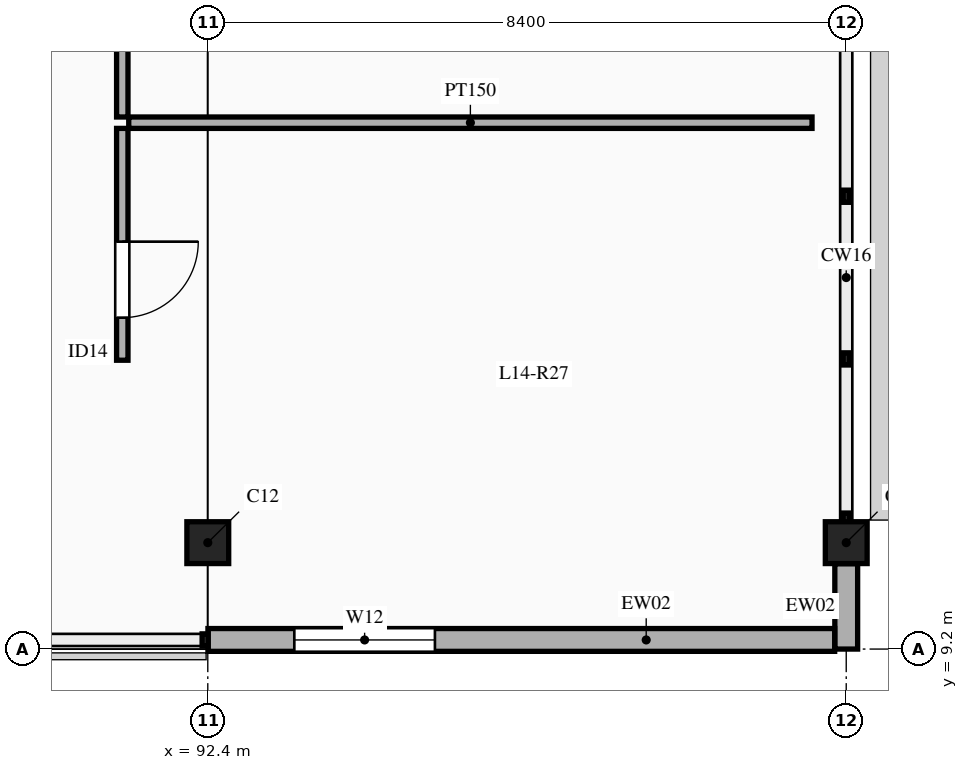
"""IFC4 building model, lengths in metres.
Left out: names, types, materials, properties, quantities, classifications, styles, units other than length and angle.
Written with IfcOpenShell. Run it as: python <this file> out.ifc"""

import sys

from ifc_helpers import new_model, si_unit, direction, frame, frame_2d, origin, origin_2d, place, context, subcontext, project, spatial, rectangle, extrude, element, fill, save


model = new_model("IFC4")
c1 = context("Model", 3, precision=1e-05, world=origin(), true_north=direction((0.0, 1.0)))
c2 = subcontext(c1, "Body", "Model", "MODEL_VIEW")
j1 = project(units=[si_unit("LENGTHUNIT", "METRE"), si_unit("PLANEANGLEUNIT", "RADIAN")], contexts=[c1])
p1 = place(None, origin())
s1 = spatial("IfcSite", under=j1, at=p1, CompositionType="ELEMENT")
p2 = place(p1, origin())
s2 = spatial("IfcBuilding", under=s1, at=p2, CompositionType="ELEMENT")
p3 = place(p2, frame((0.0, 0.0, 64.5)))
s3 = spatial("IfcBuildingStorey", under=s2, at=p3, CompositionType="ELEMENT", Elevation=64.5)
for number, where, z_axis, x_axis in (
    (1, (92.4, 10.6, 0.0), (0.0, 0.0, 1.0), (1.0, 0.0, 0.0)),
    (2, (100.8, 10.6, 0.0), (0.0, 0.0, 1.0), (1.0, 0.0, 0.0)),
):
    element("IfcColumn", number, at=place(p3, frame(where, z_axis=z_axis, x_axis=x_axis)), inside=s3, PredefinedType="COLUMN", context=c2, shape_type="SweptSolid", body=[
        extrude(rectangle(XDim=0.55, YDim=0.55, at=origin_2d()), origin(), (0.0, 0.0, 1.0), 4.5),
    ])
p4 = place(p3, frame((100.8, 9.2, 0.0), z_axis=(0.0, 0.0, 1.0), x_axis=(0.0, 1.0, 0.0)))
e3 = element("IfcWall", 3, at=p4, inside=s3, PredefinedType="SOLIDWALL", context=c2, shape_type="SweptSolid", body=[
    extrude(rectangle(XDim=1.123, YDim=0.3, at=frame_2d((0.562, 0.0))), origin(), (0.0, 0.0, 1.0), 3.55),
])
p5 = place(p3, frame((92.402, 9.32, 0.0), z_axis=(0.0, 0.0, 1.0), x_axis=(1.0, 0.0, 0.0)))
e4 = element("IfcWall", 4, at=p5, inside=s3, PredefinedType="SOLIDWALL", context=c2, shape_type="SweptSolid", body=[
    extrude(rectangle(XDim=8.246, YDim=0.3, at=frame_2d((4.123, 0.0))), origin(), (0.0, 0.0, 1.0), 3.55),
])
p6 = place(p5, frame((1.136, 0.0, 0.9)))
e5 = element("IfcOpeningElement", 5, at=p6, cuts=e4, PredefinedType="OPENING", context=c2, shape_type="SweptSolid", body=[
    extrude(rectangle(XDim=1.85, YDim=2.05, at=frame_2d((0.925, 1.025))), frame((0.0, 0.16, 0.0), z_axis=(0.0, -1.0, 0.0), x_axis=(1.0, 0.0, 0.0)), (0.0, 0.0, 1.0), 0.32),
])
p7 = place(p3, frame((91.275, 16.2, 0.0), z_axis=(0.0, 0.0, 1.0), x_axis=(0.0, 1.0, 0.0)))
e6 = element("IfcWall", 6, at=p7, inside=s3, PredefinedType="PARTITIONING", context=c2, shape_type="SweptSolid", body=[
    extrude(rectangle(XDim=6.69, YDim=0.15, at=frame_2d((3.345, 0.0))), origin(), (0.0, 0.0, 1.0), 3.45),
])
p8 = place(p3, frame((91.275, 13.0, 0.0), z_axis=(0.0, 0.0, 1.0), x_axis=(0.0, 1.0, 0.0)))
e7 = element("IfcWall", 7, at=p8, inside=s3, PredefinedType="PARTITIONING", context=c2, shape_type="SweptSolid", body=[
    extrude(rectangle(XDim=3.05, YDim=0.15, at=frame_2d((1.525, 0.0))), origin(), (0.0, 0.0, 1.0), 3.45),
])
p9 = place(p8, frame((0.56, 0.0, 0.0)))
e8 = element("IfcOpeningElement", 8, at=p9, cuts=e7, PredefinedType="OPENING", context=c2, shape_type="SweptSolid", body=[
    extrude(rectangle(XDim=1.0, YDim=2.15, at=frame_2d((0.5, 1.075))), frame((0.0, 0.085, 0.0), z_axis=(0.0, -1.0, 0.0), x_axis=(1.0, 0.0, 0.0)), (0.0, 0.0, 1.0), 0.17),
])
p10 = place(p3, frame((91.36, 16.125, 0.0), z_axis=(0.0, 0.0, 1.0), x_axis=(1.0, 0.0, 0.0)))
e9 = element("IfcWall", 9, at=p10, inside=s3, PredefinedType="PARTITIONING", context=c2, shape_type="SweptSolid", body=[
    extrude(rectangle(XDim=8.99, YDim=0.15, at=frame_2d((4.495, 0.0))), origin(), (0.0, 0.0, 1.0), 3.45),
])
p11 = place(p6, origin())
e10 = element("IfcWindow", 10, at=p11, inside=s3, PartitioningType="DOUBLE_PANEL_HORIZONTAL", PredefinedType="WINDOW", context=c2, shape_type="SweptSolid", body=[
    extrude(rectangle(XDim=1.85, YDim=2.05, at=frame_2d((0.925, 1.025))), frame((0.0, 0.03, 0.0), z_axis=(0.0, -1.0, 0.0), x_axis=(1.0, 0.0, 0.0)), (0.0, 0.0, 1.0), 0.06),
])
fill(e5, e10)
p12 = place(p9, frame((1.0, 0.0, 0.0), z_axis=(0.0, 0.0, 1.0), x_axis=(-1.0, 0.0, 0.0)))
e11 = element("IfcDoor", 11, at=p12, inside=s3, OperationType="SINGLE_SWING_LEFT", PredefinedType="DOOR", context=c2, shape_type="SweptSolid", body=[
    extrude(rectangle(XDim=1.0, YDim=2.15, at=frame_2d((0.5, 1.075))), frame((0.0, 0.025, 0.0), z_axis=(0.0, -1.0, 0.0), x_axis=(1.0, 0.0, 0.0)), (0.0, 0.0, 1.0), 0.05),
])
fill(e8, e11)
save(model, sys.argv[1])
